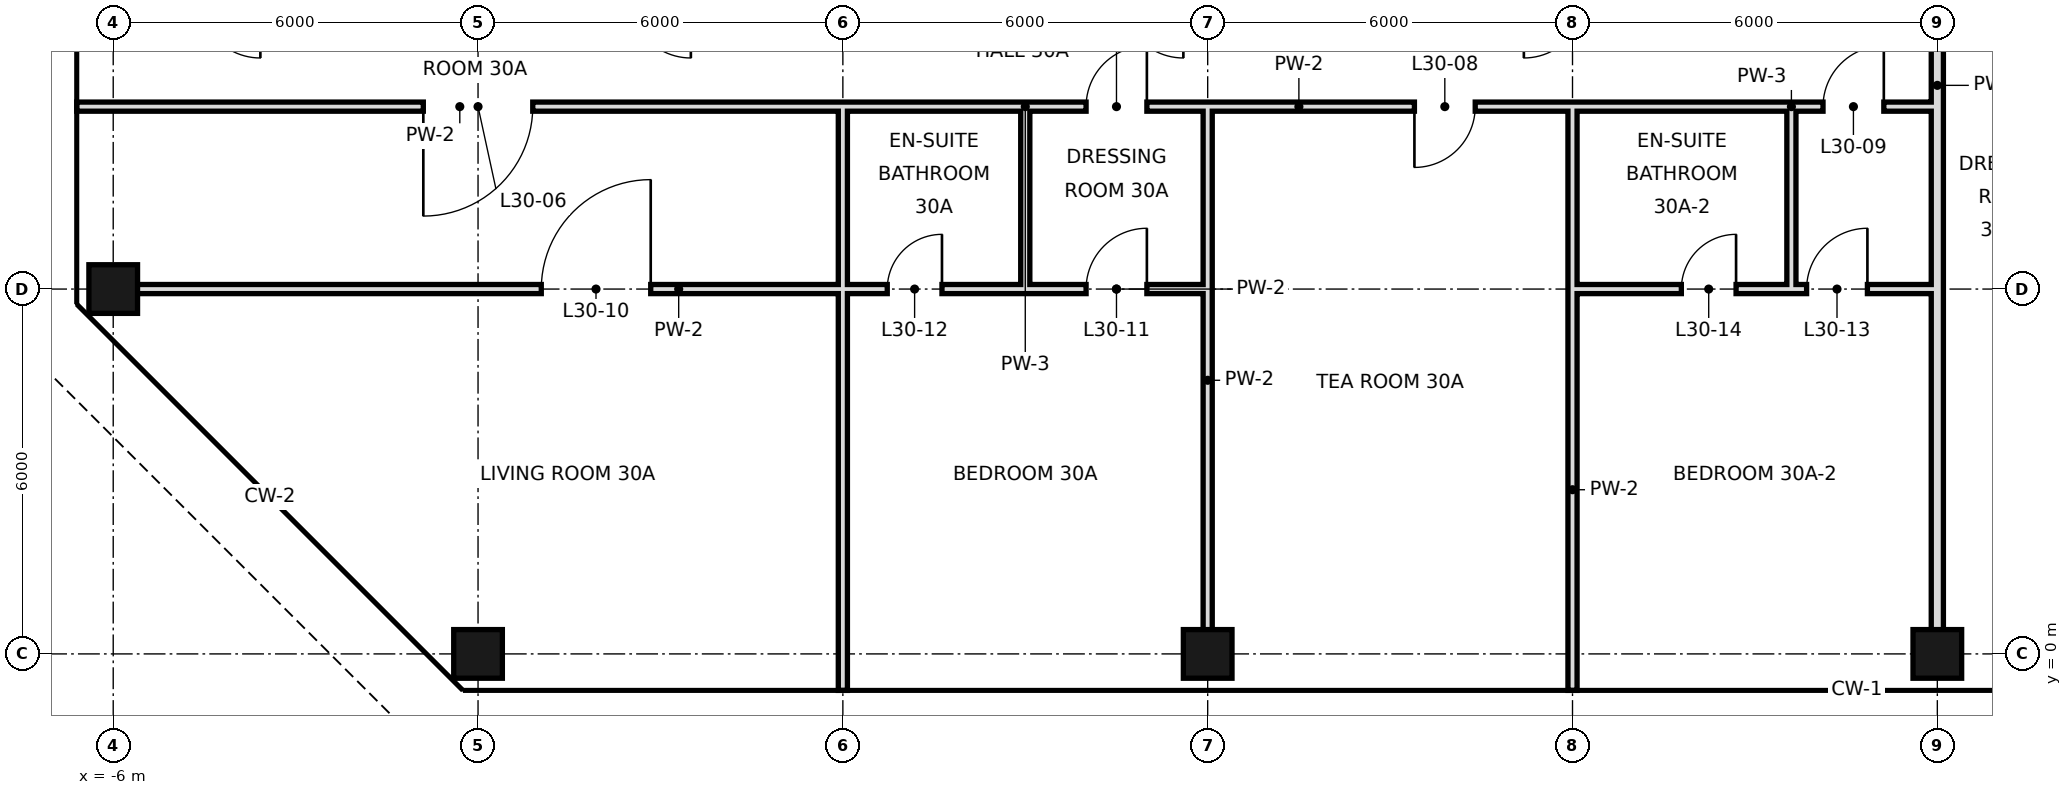
"""IFC4 building model, lengths in metres.
Left out: names, types, materials, properties, quantities, classifications, styles, units other than length and angle.
Written with IfcOpenShell. Run it as: python <this file> out.ifc"""

import sys

from ifc_helpers import new_model, si_unit, direction, frame, frame_2d, origin, origin_2d, place, context, subcontext, project, spatial, rectangle, hollow_rectangle, extrude, element, fill, save


model = new_model("IFC4")
c1 = context("Model", 3, precision=1e-05, world=origin(), true_north=direction((0.0, 1.0)))
c2 = subcontext(c1, "Body", "Model", "MODEL_VIEW")
j1 = project(units=[si_unit("LENGTHUNIT", "METRE"), si_unit("PLANEANGLEUNIT", "RADIAN")], contexts=[c1])
p1 = place(None, origin())
s1 = spatial("IfcSite", under=j1, at=p1, CompositionType="ELEMENT")
p2 = place(p1, origin())
s2 = spatial("IfcBuilding", under=s1, at=p2, CompositionType="ELEMENT")
p3 = place(p2, frame((0.0, 0.0, 134.0)))
s3 = spatial("IfcBuildingStorey", under=s2, at=p3, CompositionType="ELEMENT", Elevation=134.0)
for number, where, z_axis, x_axis in (
    (1, (-6.0, 6.0, 0.0), (0.0, 0.0, 1.0), (1.0, 0.0, 0.0)),
    (2, (0.0, 0.0, 0.0), (0.0, 0.0, 1.0), (1.0, 0.0, 0.0)),
    (3, (12.0, 0.0, 0.0), (0.0, 0.0, 1.0), (1.0, 0.0, 0.0)),
    (4, (24.0, 0.0, 0.0), (0.0, 0.0, 1.0), (1.0, 0.0, 0.0)),
):
    element("IfcColumn", number, at=place(p3, frame(where, z_axis=z_axis, x_axis=x_axis)), inside=s3, PredefinedType="COLUMN", context=c2, shape_type="SweptSolid", body=[
        extrude(hollow_rectangle(XDim=0.8, YDim=0.8, WallThickness=0.04, at=origin_2d()), origin(), (0.0, 0.0, 1.0), 4.4),
    ])
p4 = place(p3, frame((12.0, 0.0, 0.0), z_axis=(0.0, 0.0, 1.0), x_axis=(0.0, 1.0, 0.0)))
e5 = element("IfcWall", 5, at=p4, inside=s3, PredefinedType="PARTITIONING", context=c2, shape_type="SweptSolid", body=[
    extrude(rectangle(XDim=9.0, YDim=0.15, at=frame_2d((4.5, 0.0))), origin(), (0.0, 0.0, 1.0), 3.4),
])
p5 = place(p3, frame((18.0, -0.6, 0.0), z_axis=(0.0, 0.0, 1.0), x_axis=(0.0, 1.0, 0.0)))
e6 = element("IfcWall", 6, at=p5, inside=s3, PredefinedType="PARTITIONING", context=c2, shape_type="SweptSolid", body=[
    extrude(rectangle(XDim=6.6, YDim=0.15, at=frame_2d((3.3, 0.0))), origin(), (0.0, 0.0, 1.0), 3.4),
])
p6 = place(p3, frame((18.0, 6.0, 0.0), z_axis=(0.0, 0.0, 1.0), x_axis=(0.0, 1.0, 0.0)))
e7 = element("IfcWall", 7, at=p6, inside=s3, PredefinedType="PARTITIONING", context=c2, shape_type="SweptSolid", body=[
    extrude(rectangle(XDim=3.0, YDim=0.15, at=frame_2d((1.5, 0.0))), origin(), (0.0, 0.0, 1.0), 3.4),
])
p7 = place(p3, frame((21.6, 6.0, 0.0), z_axis=(0.0, 0.0, 1.0), x_axis=(0.0, 1.0, 0.0)))
e8 = element("IfcWall", 8, at=p7, inside=s3, PredefinedType="PARTITIONING", context=c2, shape_type="SweptSolid", body=[
    extrude(rectangle(XDim=3.0, YDim=0.15, at=frame_2d((1.5, 0.0))), origin(), (0.0, 0.0, 1.0), 4.1),
])
p8 = place(p3, frame((24.0, 0.0, 0.0), z_axis=(0.0, 0.0, 1.0), x_axis=(0.0, 1.0, 0.0)))
e9 = element("IfcWall", 9, at=p8, inside=s3, PredefinedType="SOLIDWALL", context=c2, shape_type="SweptSolid", body=[
    extrude(rectangle(XDim=18.7, YDim=0.2, at=frame_2d((9.35, 0.0))), origin(), (0.0, 0.0, 1.0), 3.4),
])
p9 = place(p3, frame((6.0, -0.6, 0.0), z_axis=(0.0, 0.0, 1.0), x_axis=(0.0, 1.0, 0.0)))
e10 = element("IfcWall", 10, at=p9, inside=s3, PredefinedType="PARTITIONING", context=c2, shape_type="SweptSolid", body=[
    extrude(rectangle(XDim=6.6, YDim=0.15, at=frame_2d((3.3, 0.0))), origin(), (0.0, 0.0, 1.0), 3.4),
])
p10 = place(p3, frame((6.0, 6.0, 0.0), z_axis=(0.0, 0.0, 1.0), x_axis=(0.0, 1.0, 0.0)))
e11 = element("IfcWall", 11, at=p10, inside=s3, PredefinedType="PARTITIONING", context=c2, shape_type="SweptSolid", body=[
    extrude(rectangle(XDim=3.0, YDim=0.15, at=frame_2d((1.5, 0.0))), origin(), (0.0, 0.0, 1.0), 3.4),
])
p11 = place(p3, frame((9.0, 6.0, 0.0), z_axis=(0.0, 0.0, 1.0), x_axis=(0.0, 1.0, 0.0)))
e12 = element("IfcWall", 12, at=p11, inside=s3, PredefinedType="PARTITIONING", context=c2, shape_type="SweptSolid", body=[
    extrude(rectangle(XDim=3.0, YDim=0.15, at=frame_2d((1.5, 0.0))), origin(), (0.0, 0.0, 1.0), 4.1),
])
p12 = place(p3, frame((-6.0, 6.0, 0.0), z_axis=(0.0, 0.0, 1.0), x_axis=(1.0, 0.0, 0.0)))
e13 = element("IfcWall", 13, at=p12, inside=s3, PredefinedType="PARTITIONING", context=c2, shape_type="SweptSolid", body=[
    extrude(rectangle(XDim=12.0, YDim=0.15, at=frame_2d((6.0, 0.0))), origin(), (0.0, 0.0, 1.0), 3.65),
])
p13 = place(p12, frame((7.04, 0.0, 0.0)))
e14 = element("IfcOpeningElement", 14, at=p13, cuts=e13, PredefinedType="OPENING", context=c2, shape_type="SweptSolid", body=[
    extrude(rectangle(XDim=1.8, YDim=2.4, at=frame_2d((0.9, 1.2))), frame((0.0, 0.085, 0.0), z_axis=(0.0, -1.0, 0.0), x_axis=(1.0, 0.0, 0.0)), (0.0, 0.0, 1.0), 0.17),
])
p14 = place(p3, frame((9.0, 6.0, 0.0), z_axis=(0.0, 0.0, 1.0), x_axis=(1.0, 0.0, 0.0)))
e15 = element("IfcWall", 15, at=p14, inside=s3, PredefinedType="PARTITIONING", context=c2, shape_type="SweptSolid", body=[
    extrude(rectangle(XDim=3.0, YDim=0.15, at=frame_2d((1.5, 0.0))), origin(), (0.0, 0.0, 1.0), 3.65),
])
p15 = place(p14, frame((1.0, 0.0, 0.0)))
e16 = element("IfcOpeningElement", 16, at=p15, cuts=e15, PredefinedType="OPENING", context=c2, shape_type="SweptSolid", body=[
    extrude(rectangle(XDim=1.0, YDim=2.4, at=frame_2d((0.5, 1.2))), frame((0.0, 0.085, 0.0), z_axis=(0.0, -1.0, 0.0), x_axis=(1.0, 0.0, 0.0)), (0.0, 0.0, 1.0), 0.17),
])
p16 = place(p3, frame((21.6, 6.0, 0.0), z_axis=(0.0, 0.0, 1.0), x_axis=(1.0, 0.0, 0.0)))
e17 = element("IfcWall", 17, at=p16, inside=s3, PredefinedType="PARTITIONING", context=c2, shape_type="SweptSolid", body=[
    extrude(rectangle(XDim=2.4, YDim=0.15, at=frame_2d((1.2, 0.0))), origin(), (0.0, 0.0, 1.0), 3.65),
])
p17 = place(p16, frame((0.25, 0.0, 0.0)))
e18 = element("IfcOpeningElement", 18, at=p17, cuts=e17, PredefinedType="OPENING", context=c2, shape_type="SweptSolid", body=[
    extrude(rectangle(XDim=1.0, YDim=2.4, at=frame_2d((0.5, 1.2))), frame((0.0, 0.085, 0.0), z_axis=(0.0, -1.0, 0.0), x_axis=(1.0, 0.0, 0.0)), (0.0, 0.0, 1.0), 0.17),
])
p18 = place(p3, frame((6.0, 6.0, 0.0), z_axis=(0.0, 0.0, 1.0), x_axis=(1.0, 0.0, 0.0)))
e19 = element("IfcWall", 19, at=p18, inside=s3, PredefinedType="PARTITIONING", context=c2, shape_type="SweptSolid", body=[
    extrude(rectangle(XDim=3.0, YDim=0.15, at=frame_2d((1.5, 0.0))), origin(), (0.0, 0.0, 1.0), 3.65),
])
p19 = place(p18, frame((0.73, 0.0, 0.0)))
e20 = element("IfcOpeningElement", 20, at=p19, cuts=e19, PredefinedType="OPENING", context=c2, shape_type="SweptSolid", body=[
    extrude(rectangle(XDim=0.9, YDim=2.4, at=frame_2d((0.45, 1.2))), frame((0.0, 0.085, 0.0), z_axis=(0.0, -1.0, 0.0), x_axis=(1.0, 0.0, 0.0)), (0.0, 0.0, 1.0), 0.17),
])
p20 = place(p3, frame((18.0, 6.0, 0.0), z_axis=(0.0, 0.0, 1.0), x_axis=(1.0, 0.0, 0.0)))
e21 = element("IfcWall", 21, at=p20, inside=s3, PredefinedType="PARTITIONING", context=c2, shape_type="SweptSolid", body=[
    extrude(rectangle(XDim=3.6, YDim=0.15, at=frame_2d((1.8, 0.0))), origin(), (0.0, 0.0, 1.0), 3.65),
])
p21 = place(p20, frame((1.79, 0.0, 0.0)))
e22 = element("IfcOpeningElement", 22, at=p21, cuts=e21, PredefinedType="OPENING", context=c2, shape_type="SweptSolid", body=[
    extrude(rectangle(XDim=0.9, YDim=2.4, at=frame_2d((0.45, 1.2))), frame((0.0, 0.085, 0.0), z_axis=(0.0, -1.0, 0.0), x_axis=(1.0, 0.0, 0.0)), (0.0, 0.0, 1.0), 0.17),
])
p22 = place(p3, frame((-6.6, 9.0, 0.0), z_axis=(0.0, 0.0, 1.0), x_axis=(1.0, 0.0, 0.0)))
e23 = element("IfcWall", 23, at=p22, inside=s3, PredefinedType="PARTITIONING", context=c2, shape_type="SweptSolid", body=[
    extrude(rectangle(XDim=12.6, YDim=0.15, at=frame_2d((6.3, 0.0))), origin(), (0.0, 0.0, 1.0), 4.1),
])
p23 = place(p22, frame((5.7, 0.0, 0.0)))
e24 = element("IfcOpeningElement", 24, at=p23, cuts=e23, PredefinedType="OPENING", context=c2, shape_type="SweptSolid", body=[
    extrude(rectangle(XDim=1.8, YDim=2.4, at=frame_2d((0.9, 1.2))), frame((0.0, 0.085, 0.0), z_axis=(0.0, -1.0, 0.0), x_axis=(1.0, 0.0, 0.0)), (0.0, 0.0, 1.0), 0.17),
])
p24 = place(p3, frame((9.0, 9.0, 0.0), z_axis=(0.0, 0.0, 1.0), x_axis=(1.0, 0.0, 0.0)))
e25 = element("IfcWall", 25, at=p24, inside=s3, PredefinedType="PARTITIONING", context=c2, shape_type="SweptSolid", body=[
    extrude(rectangle(XDim=9.0, YDim=0.15, at=frame_2d((4.5, 0.0))), origin(), (0.0, 0.0, 1.0), 4.1),
])
p25 = place(p24, frame((1.0, 0.0, 0.0)))
e26 = element("IfcOpeningElement", 26, at=p25, cuts=e25, PredefinedType="OPENING", context=c2, shape_type="SweptSolid", body=[
    extrude(rectangle(XDim=1.0, YDim=2.4, at=frame_2d((0.5, 1.2))), frame((0.0, 0.085, 0.0), z_axis=(0.0, -1.0, 0.0), x_axis=(1.0, 0.0, 0.0)), (0.0, 0.0, 1.0), 0.17),
])
p26 = place(p24, frame((6.4, 0.0, 0.0)))
e27 = element("IfcOpeningElement", 27, at=p26, cuts=e25, PredefinedType="OPENING", context=c2, shape_type="SweptSolid", body=[
    extrude(rectangle(XDim=1.0, YDim=2.4, at=frame_2d((0.5, 1.2))), frame((0.0, 0.085, 0.0), z_axis=(0.0, -1.0, 0.0), x_axis=(1.0, 0.0, 0.0)), (0.0, 0.0, 1.0), 0.17),
])
p27 = place(p3, frame((21.6, 9.0, 0.0), z_axis=(0.0, 0.0, 1.0), x_axis=(1.0, 0.0, 0.0)))
e28 = element("IfcWall", 28, at=p27, inside=s3, PredefinedType="PARTITIONING", context=c2, shape_type="SweptSolid", body=[
    extrude(rectangle(XDim=2.4, YDim=0.15, at=frame_2d((1.2, 0.0))), origin(), (0.0, 0.0, 1.0), 4.1),
])
p28 = place(p27, frame((0.52, 0.0, 0.0)))
e29 = element("IfcOpeningElement", 29, at=p28, cuts=e28, PredefinedType="OPENING", context=c2, shape_type="SweptSolid", body=[
    extrude(rectangle(XDim=1.0, YDim=2.4, at=frame_2d((0.5, 1.2))), frame((0.0, 0.085, 0.0), z_axis=(0.0, -1.0, 0.0), x_axis=(1.0, 0.0, 0.0)), (0.0, 0.0, 1.0), 0.17),
])
p29 = place(p3, frame((6.0, 9.0, 0.0), z_axis=(0.0, 0.0, 1.0), x_axis=(1.0, 0.0, 0.0)))
e30 = element("IfcWall", 30, at=p29, inside=s3, PredefinedType="PARTITIONING", context=c2, shape_type="SweptSolid", body=[
    extrude(rectangle(XDim=3.0, YDim=0.15, at=frame_2d((1.5, 0.0))), origin(), (0.0, 0.0, 1.0), 4.1),
])
p30 = place(p3, frame((18.0, 9.0, 0.0), z_axis=(0.0, 0.0, 1.0), x_axis=(1.0, 0.0, 0.0)))
e31 = element("IfcWall", 31, at=p30, inside=s3, PredefinedType="PARTITIONING", context=c2, shape_type="SweptSolid", body=[
    extrude(rectangle(XDim=3.6, YDim=0.15, at=frame_2d((1.8, 0.0))), origin(), (0.0, 0.0, 1.0), 4.1),
])
p31 = place(p23, frame((1.8, 0.0, 0.0), z_axis=(0.0, 0.0, 1.0), x_axis=(-1.0, 0.0, 0.0)))
e32 = element("IfcDoor", 32, at=p31, inside=s3, OperationType="SINGLE_SWING_RIGHT", PredefinedType="DOOR", context=c2, shape_type="SweptSolid", body=[
    extrude(rectangle(XDim=1.8, YDim=2.4, at=frame_2d((0.9, 1.2))), frame((0.0, 0.025, 0.0), z_axis=(0.0, -1.0, 0.0), x_axis=(1.0, 0.0, 0.0)), (0.0, 0.0, 1.0), 0.05),
])
fill(e24, e32)
p32 = place(p25, frame((1.0, 0.0, 0.0), z_axis=(0.0, 0.0, 1.0), x_axis=(-1.0, 0.0, 0.0)))
e33 = element("IfcDoor", 33, at=p32, inside=s3, OperationType="SINGLE_SWING_LEFT", PredefinedType="DOOR", context=c2, shape_type="SweptSolid", body=[
    extrude(rectangle(XDim=1.0, YDim=2.4, at=frame_2d((0.5, 1.2))), frame((0.0, 0.025, 0.0), z_axis=(0.0, -1.0, 0.0), x_axis=(1.0, 0.0, 0.0)), (0.0, 0.0, 1.0), 0.05),
])
fill(e26, e33)
p33 = place(p26, frame((1.0, 0.0, 0.0), z_axis=(0.0, 0.0, 1.0), x_axis=(-1.0, 0.0, 0.0)))
e34 = element("IfcDoor", 34, at=p33, inside=s3, OperationType="SINGLE_SWING_RIGHT", PredefinedType="DOOR", context=c2, shape_type="SweptSolid", body=[
    extrude(rectangle(XDim=1.0, YDim=2.4, at=frame_2d((0.5, 1.2))), frame((0.0, 0.025, 0.0), z_axis=(0.0, -1.0, 0.0), x_axis=(1.0, 0.0, 0.0)), (0.0, 0.0, 1.0), 0.05),
])
fill(e27, e34)
p34 = place(p28, frame((1.0, 0.0, 0.0), z_axis=(0.0, 0.0, 1.0), x_axis=(-1.0, 0.0, 0.0)))
e35 = element("IfcDoor", 35, at=p34, inside=s3, OperationType="SINGLE_SWING_LEFT", PredefinedType="DOOR", context=c2, shape_type="SweptSolid", body=[
    extrude(rectangle(XDim=1.0, YDim=2.4, at=frame_2d((0.5, 1.2))), frame((0.0, 0.025, 0.0), z_axis=(0.0, -1.0, 0.0), x_axis=(1.0, 0.0, 0.0)), (0.0, 0.0, 1.0), 0.05),
])
fill(e29, e35)
p35 = place(p13, frame((1.8, 0.0, 0.0), z_axis=(0.0, 0.0, 1.0), x_axis=(-1.0, 0.0, 0.0)))
e36 = element("IfcDoor", 36, at=p35, inside=s3, OperationType="SINGLE_SWING_LEFT", PredefinedType="DOOR", context=c2, shape_type="SweptSolid", body=[
    extrude(rectangle(XDim=1.8, YDim=2.4, at=frame_2d((0.9, 1.2))), frame((0.0, 0.025, 0.0), z_axis=(0.0, -1.0, 0.0), x_axis=(1.0, 0.0, 0.0)), (0.0, 0.0, 1.0), 0.05),
])
fill(e14, e36)
p36 = place(p15, frame((1.0, 0.0, 0.0), z_axis=(0.0, 0.0, 1.0), x_axis=(-1.0, 0.0, 0.0)))
e37 = element("IfcDoor", 37, at=p36, inside=s3, OperationType="SINGLE_SWING_LEFT", PredefinedType="DOOR", context=c2, shape_type="SweptSolid", body=[
    extrude(rectangle(XDim=1.0, YDim=2.4, at=frame_2d((0.5, 1.2))), frame((0.0, 0.025, 0.0), z_axis=(0.0, -1.0, 0.0), x_axis=(1.0, 0.0, 0.0)), (0.0, 0.0, 1.0), 0.05),
])
fill(e16, e37)
p37 = place(p19, frame((0.9, 0.0, 0.0), z_axis=(0.0, 0.0, 1.0), x_axis=(-1.0, 0.0, 0.0)))
e38 = element("IfcDoor", 38, at=p37, inside=s3, OperationType="SINGLE_SWING_LEFT", PredefinedType="DOOR", context=c2, shape_type="SweptSolid", body=[
    extrude(rectangle(XDim=0.9, YDim=2.4, at=frame_2d((0.45, 1.2))), frame((0.0, 0.025, 0.0), z_axis=(0.0, -1.0, 0.0), x_axis=(1.0, 0.0, 0.0)), (0.0, 0.0, 1.0), 0.05),
])
fill(e20, e38)
p38 = place(p17, frame((1.0, 0.0, 0.0), z_axis=(0.0, 0.0, 1.0), x_axis=(-1.0, 0.0, 0.0)))
e39 = element("IfcDoor", 39, at=p38, inside=s3, OperationType="SINGLE_SWING_LEFT", PredefinedType="DOOR", context=c2, shape_type="SweptSolid", body=[
    extrude(rectangle(XDim=1.0, YDim=2.4, at=frame_2d((0.5, 1.2))), frame((0.0, 0.025, 0.0), z_axis=(0.0, -1.0, 0.0), x_axis=(1.0, 0.0, 0.0)), (0.0, 0.0, 1.0), 0.05),
])
fill(e18, e39)
p39 = place(p21, frame((0.9, 0.0, 0.0), z_axis=(0.0, 0.0, 1.0), x_axis=(-1.0, 0.0, 0.0)))
e40 = element("IfcDoor", 40, at=p39, inside=s3, OperationType="SINGLE_SWING_LEFT", PredefinedType="DOOR", context=c2, shape_type="SweptSolid", body=[
    extrude(rectangle(XDim=0.9, YDim=2.4, at=frame_2d((0.45, 1.2))), frame((0.0, 0.025, 0.0), z_axis=(0.0, -1.0, 0.0), x_axis=(1.0, 0.0, 0.0)), (0.0, 0.0, 1.0), 0.05),
])
fill(e22, e40)
save(model, sys.argv[1])
